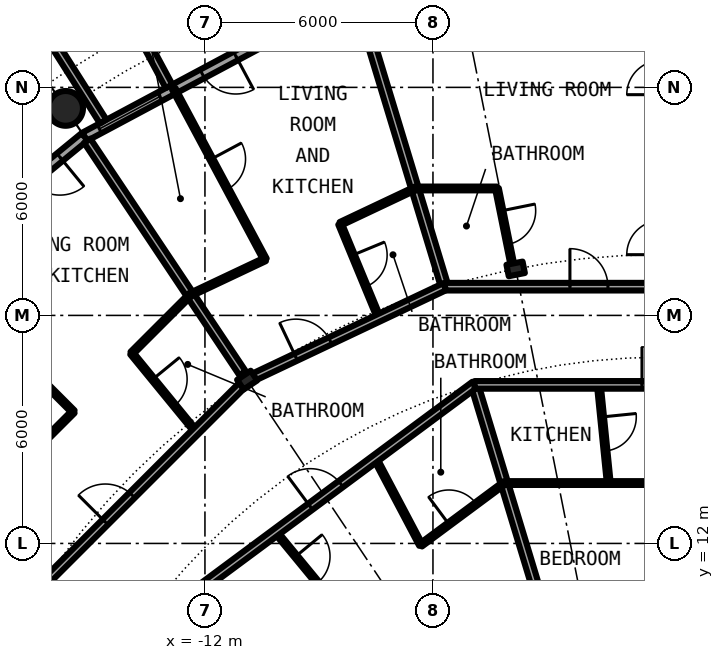
"""IFC4 building model, lengths in metres.
Left out: names, types, materials, properties, quantities, classifications, styles, units other than length and angle.
Written with IfcOpenShell. Run it as: python <this file> out.ifc"""

import sys

from ifc_helpers import new_model, si_unit, direction, frame, frame_2d, origin, origin_2d, place, context, subcontext, project, spatial, rectangle, hollow_circle, i_section, extrude, element, fill, save


model = new_model("IFC4")
c1 = context("Model", 3, precision=1e-05, world=origin(), true_north=direction((0.0, 1.0)))
c2 = subcontext(c1, "Body", "Model", "MODEL_VIEW")
j1 = project(units=[si_unit("LENGTHUNIT", "METRE"), si_unit("PLANEANGLEUNIT", "RADIAN")], contexts=[c1])
p1 = place(None, origin())
s1 = spatial("IfcSite", under=j1, at=p1, CompositionType="ELEMENT")
p2 = place(p1, origin())
s2 = spatial("IfcBuilding", under=s1, at=p2, CompositionType="ELEMENT")
p3 = place(p2, frame((0.0, 0.0, 120.8)))
s3 = spatial("IfcBuildingStorey", under=s2, at=p3, CompositionType="ELEMENT", Elevation=120.8)
p4 = place(p3, frame((-15.667, 23.448, 0.0), z_axis=(0.0, 0.0, 1.0), x_axis=(1.0, 0.0, 0.0)))
e1 = element("IfcColumn", 1, at=p4, inside=s3, PredefinedType="COLUMN", context=c2, shape_type="SweptSolid", body=[
    extrude(hollow_circle(Radius=0.457, WallThickness=0.04, at=origin_2d()), origin(), (0.0, 0.0, 1.0), 3.05),
])
for number, where, z_axis, x_axis in (
    (2, (-3.824, 19.223, 0.0), (0.0, 0.0, 1.0), (-0.195, 0.981, 0.0)),
    (3, (-10.889, 16.297, 0.0), (0.0, 0.0, 1.0), (-0.556, 0.831, 0.0)),
):
    element("IfcColumn", number, at=place(p3, frame(where, z_axis=z_axis, x_axis=x_axis)), inside=s3, PredefinedType="COLUMN", context=c2, shape_type="SweptSolid", body=[
        extrude(i_section(OverallWidth=0.307, OverallDepth=0.432, WebThickness=0.021, FlangeThickness=0.04, FilletRadius=0.027, at=origin_2d()), origin(), (0.0, 0.0, 1.0), 3.05),
    ])
p5 = place(p3, frame((-10.447, 25.222, 0.0), z_axis=(0.0, 0.0, 1.0), x_axis=(-0.881915646801, -0.471407246368, 0.0)))
e4 = element("IfcWall", 4, at=p5, inside=s3, PredefinedType="SOLIDWALL", context=c2, shape_type="SweptSolid", body=[
    extrude(rectangle(XDim=5.352, YDim=0.25, at=frame_2d((2.676, 0.0))), origin(), (0.0, 0.0, 1.0), 2.7),
])
p6 = place(p5, frame((0.841, 0.0, 0.0)))
e5 = element("IfcOpeningElement", 5, at=p6, cuts=e4, PredefinedType="OPENING", context=c2, shape_type="SweptSolid", body=[
    extrude(rectangle(XDim=1.0, YDim=2.2, at=frame_2d((0.5, 1.1))), frame((0.0, 0.135, 0.0), z_axis=(0.0, -1.0, 0.0), x_axis=(1.0, 0.0, 0.0)), (0.0, 0.0, 1.0), 0.27),
])
p7 = place(p5, frame((3.111, 0.0, 0.3)))
e6 = element("IfcOpeningElement", 6, at=p7, cuts=e4, PredefinedType="OPENING", context=c2, shape_type="SweptSolid", body=[
    extrude(rectangle(XDim=1.8, YDim=2.1, at=frame_2d((0.9, 1.05))), frame((0.0, 0.135, 0.0), z_axis=(0.0, -1.0, 0.0), x_axis=(1.0, 0.0, 0.0)), (0.0, 0.0, 1.0), 0.27),
])
p8 = place(p3, frame((-12.945, 24.029, -0.03), z_axis=(0.0, 0.0, 1.0), x_axis=(-0.474424310775, 0.88029629861, 0.0)))
e7 = element("IfcWall", 7, at=p8, inside=s3, PredefinedType="SOLIDWALL", context=c2, shape_type="SweptSolid", body=[
    extrude(rectangle(XDim=3.006, YDim=0.2, at=frame_2d((1.503, 0.0))), origin(), (0.0, 0.0, 1.0), 2.73),
])
p9 = place(p3, frame((-14.678, 23.102, -0.03), z_axis=(0.0, 0.0, 1.0), x_axis=(-0.536001536573, 0.844217005746, 0.0)))
e8 = element("IfcWall", 8, at=p9, inside=s3, PredefinedType="SOLIDWALL", context=c2, shape_type="SweptSolid", body=[
    extrude(rectangle(XDim=2.929, YDim=0.2, at=frame_2d((1.465, 0.0))), origin(), (0.0, 0.0, 1.0), 2.73),
])
p10 = place(p3, frame((-15.167, 22.699, 0.0), z_axis=(0.0, 0.0, 1.0), x_axis=(-0.773019449054, -0.634382322723, 0.0)))
e9 = element("IfcWall", 9, at=p10, inside=s3, PredefinedType="SOLIDWALL", context=c2, shape_type="SweptSolid", body=[
    extrude(rectangle(XDim=5.352, YDim=0.25, at=frame_2d((2.676, 0.0))), origin(), (0.0, 0.0, 1.0), 2.7),
])
p11 = place(p10, frame((0.841, 0.0, 0.0)))
e10 = element("IfcOpeningElement", 10, at=p11, cuts=e9, PredefinedType="OPENING", context=c2, shape_type="SweptSolid", body=[
    extrude(rectangle(XDim=1.0, YDim=2.2, at=frame_2d((0.5, 1.1))), frame((0.0, 0.135, 0.0), z_axis=(0.0, -1.0, 0.0), x_axis=(1.0, 0.0, 0.0)), (0.0, 0.0, 1.0), 0.27),
])
p12 = place(p10, frame((3.111, 0.0, 0.3)))
e11 = element("IfcOpeningElement", 11, at=p12, cuts=e9, PredefinedType="OPENING", context=c2, shape_type="SweptSolid", body=[
    extrude(rectangle(XDim=1.8, YDim=2.1, at=frame_2d((0.9, 1.05))), frame((0.0, 0.135, 0.0), z_axis=(0.0, -1.0, 0.0), x_axis=(1.0, 0.0, 0.0)), (0.0, 0.0, 1.0), 0.27),
])
p13 = place(p3, frame((-7.887, 26.005, 0.0), z_axis=(0.0, 0.0, 1.0), x_axis=(0.29005838641, -0.957008951094, 0.0)))
e12 = element("IfcWall", 12, at=p13, inside=s3, PredefinedType="PARTITIONING", context=c2, shape_type="SweptSolid", body=[
    extrude(rectangle(XDim=7.574, YDim=0.2, at=frame_2d((3.787, 0.0))), origin(), (0.0, 0.0, 1.0), 2.7),
])
p14 = place(p3, frame((-4.907, 16.172, 0.0), z_axis=(0.0, 0.0, 1.0), x_axis=(0.289977130626, -0.957033575019, 0.0)))
e13 = element("IfcWall", 13, at=p14, inside=s3, PredefinedType="PARTITIONING", context=c2, shape_type="SweptSolid", body=[
    extrude(rectangle(XDim=9.18, YDim=0.2, at=frame_2d((4.59, 0.0))), origin(), (0.0, 0.0, 1.0), 2.7),
])
p15 = place(p3, frame((-19.216, 19.216, 0.0), z_axis=(0.0, 0.0, 1.0), x_axis=(0.707106781187, -0.707106781187, 0.0)))
e14 = element("IfcWall", 14, at=p15, inside=s3, PredefinedType="PARTITIONING", context=c2, shape_type="SweptSolid", body=[
    extrude(rectangle(XDim=5.305, YDim=0.1, at=frame_2d((2.652, 0.0))), origin(), (0.0, 0.0, 1.0), 2.7),
])
p16 = place(p15, frame((2.202, 0.0, 0.0)))
e15 = element("IfcOpeningElement", 15, at=p16, cuts=e14, PredefinedType="OPENING", context=c2, shape_type="SweptSolid", body=[
    extrude(rectangle(XDim=0.9, YDim=2.3, at=frame_2d((0.45, 1.15))), frame((0.0, 0.06, 0.0), z_axis=(0.0, -1.0, 0.0), x_axis=(1.0, 0.0, 0.0)), (0.0, 0.0, 1.0), 0.12),
])
p17 = place(p3, frame((-15.097, 22.595, 0.0), z_axis=(0.0, 0.0, 1.0), x_axis=(0.555572791, -0.831467903109, 0.0)))
e16 = element("IfcWall", 16, at=p17, inside=s3, PredefinedType="PARTITIONING", context=c2, shape_type="SweptSolid", body=[
    extrude(rectangle(XDim=7.358, YDim=0.2, at=frame_2d((3.679, 0.0))), origin(), (0.0, 0.0, 1.0), 2.7),
])
p18 = place(p3, frame((-13.927, 17.004, 0.0), z_axis=(0.0, 0.0, 1.0), x_axis=(0.633582447834, -0.77367517848, 0.0)))
e17 = element("IfcWall", 17, at=p18, inside=s3, PredefinedType="PARTITIONING", context=c2, shape_type="SweptSolid", body=[
    extrude(rectangle(XDim=2.661, YDim=0.1, at=frame_2d((1.331, 0.0))), origin(), (0.0, 0.0, 1.0), 2.7),
])
p19 = place(p18, frame((0.881, 0.0, 0.0)))
e18 = element("IfcOpeningElement", 18, at=p19, cuts=e17, PredefinedType="OPENING", context=c2, shape_type="SweptSolid", body=[
    extrude(rectangle(XDim=0.9, YDim=2.3, at=frame_2d((0.45, 1.15))), frame((0.0, 0.06, 0.0), z_axis=(0.0, -1.0, 0.0), x_axis=(1.0, 0.0, 0.0)), (0.0, 0.0, 1.0), 0.12),
])
p20 = place(p3, frame((-12.82, 23.961, 0.0), z_axis=(0.0, 0.0, 1.0), x_axis=(0.471735511233, -0.881740101981, 0.0)))
e19 = element("IfcWall", 19, at=p20, inside=s3, PredefinedType="PARTITIONING", context=c2, shape_type="SweptSolid", body=[
    extrude(rectangle(XDim=5.09, YDim=0.1, at=frame_2d((2.545, 0.0))), origin(), (0.0, 0.0, 1.0), 2.7),
])
p21 = place(p20, frame((2.095, 0.0, 0.0)))
e20 = element("IfcOpeningElement", 20, at=p21, cuts=e19, PredefinedType="OPENING", context=c2, shape_type="SweptSolid", body=[
    extrude(rectangle(XDim=0.9, YDim=2.3, at=frame_2d((0.45, 1.15))), frame((0.0, 0.06, 0.0), z_axis=(0.0, -1.0, 0.0), x_axis=(1.0, 0.0, 0.0)), (0.0, 0.0, 1.0), 0.12),
])
p22 = place(p3, frame((-10.132, 12.296, 0.0), z_axis=(0.0, 0.0, 1.0), x_axis=(0.635976043025, -0.771708800454, 0.0)))
e21 = element("IfcWall", 21, at=p22, inside=s3, PredefinedType="PARTITIONING", context=c2, shape_type="SweptSolid", body=[
    extrude(rectangle(XDim=8.213, YDim=0.1, at=frame_2d((4.106, 0.0))), origin(), (0.0, 0.0, 1.0), 2.7),
])
p23 = place(p22, frame((0.823, 0.0, 0.0)))
e22 = element("IfcOpeningElement", 22, at=p23, cuts=e21, PredefinedType="OPENING", context=c2, shape_type="SweptSolid", body=[
    extrude(rectangle(XDim=0.9, YDim=2.3, at=frame_2d((0.45, 1.15))), frame((0.0, 0.06, 0.0), z_axis=(0.0, -1.0, 0.0), x_axis=(1.0, 0.0, 0.0)), (0.0, 0.0, 1.0), 0.12),
])
p24 = place(p22, frame((4.929, 0.0, 0.0)))
e23 = element("IfcOpeningElement", 23, at=p24, cuts=e21, PredefinedType="OPENING", context=c2, shape_type="SweptSolid", body=[
    extrude(rectangle(XDim=0.9, YDim=2.3, at=frame_2d((0.45, 1.15))), frame((0.0, 0.06, 0.0), z_axis=(0.0, -1.0, 0.0), x_axis=(1.0, 0.0, 0.0)), (0.0, 0.0, 1.0), 0.12),
])
p25 = place(p3, frame((-8.445, 20.407, 0.0), z_axis=(0.0, 0.0, 1.0), x_axis=(0.382195876364, -0.924081334132, 0.0)))
e24 = element("IfcWall", 24, at=p25, inside=s3, PredefinedType="PARTITIONING", context=c2, shape_type="SweptSolid", body=[
    extrude(rectangle(XDim=2.674, YDim=0.1, at=frame_2d((1.337, 0.0))), origin(), (0.0, 0.0, 1.0), 2.7),
])
p26 = place(p25, frame((0.887, 0.0, 0.0)))
e25 = element("IfcOpeningElement", 25, at=p26, cuts=e24, PredefinedType="OPENING", context=c2, shape_type="SweptSolid", body=[
    extrude(rectangle(XDim=0.9, YDim=2.3, at=frame_2d((0.45, 1.15))), frame((0.0, 0.06, 0.0), z_axis=(0.0, -1.0, 0.0), x_axis=(1.0, 0.0, 0.0)), (0.0, 0.0, 1.0), 0.12),
])
p27 = place(p3, frame((-7.519, 14.234, 0.0), z_axis=(0.0, 0.0, 1.0), x_axis=(0.467001992543, -0.884256263173, 0.0)))
e26 = element("IfcWall", 26, at=p27, inside=s3, PredefinedType="PARTITIONING", context=c2, shape_type="SweptSolid", body=[
    extrude(rectangle(XDim=2.572, YDim=0.1, at=frame_2d((1.286, 0.0))), origin(), (0.0, 0.0, 1.0), 2.7),
])
p28 = place(p3, frame((-4.316, 21.34, 0.0), z_axis=(0.0, 0.0, 1.0), x_axis=(0.198348087074, -0.980131642359, 0.0)))
e27 = element("IfcWall", 27, at=p28, inside=s3, PredefinedType="PARTITIONING", context=c2, shape_type="SweptSolid", body=[
    extrude(rectangle(XDim=1.956, YDim=0.1, at=frame_2d((0.978, 0.0))), origin(), (0.0, 0.0, 1.0), 2.7),
])
p29 = place(p28, frame((0.6, 0.0, 0.0)))
e28 = element("IfcOpeningElement", 28, at=p29, cuts=e27, PredefinedType="OPENING", context=c2, shape_type="SweptSolid", body=[
    extrude(rectangle(XDim=0.9, YDim=2.3, at=frame_2d((0.45, 1.15))), frame((0.0, 0.06, 0.0), z_axis=(0.0, -1.0, 0.0), x_axis=(1.0, 0.0, 0.0)), (0.0, 0.0, 1.0), 0.12),
])
p30 = place(p3, frame((-1.635, 16.172, 0.0), z_axis=(0.0, 0.0, 1.0), x_axis=(0.100527855112, -0.994934244233, 0.0)))
e29 = element("IfcWall", 29, at=p30, inside=s3, PredefinedType="PARTITIONING", context=c2, shape_type="SweptSolid", body=[
    extrude(rectangle(XDim=2.596, YDim=0.1, at=frame_2d((1.298, 0.0))), origin(), (0.0, 0.0, 1.0), 2.7),
])
p31 = place(p30, frame((0.848, 0.0, 0.0)))
e30 = element("IfcOpeningElement", 30, at=p31, cuts=e29, PredefinedType="OPENING", context=c2, shape_type="SweptSolid", body=[
    extrude(rectangle(XDim=0.9, YDim=2.3, at=frame_2d((0.45, 1.15))), frame((0.0, 0.06, 0.0), z_axis=(0.0, -1.0, 0.0), x_axis=(1.0, 0.0, 0.0)), (0.0, 0.0, 1.0), 0.12),
])
p32 = place(p3, frame((-6.318, 11.96, 0.0), z_axis=(0.0, 0.0, 1.0), x_axis=(0.803128348509, 0.595806055542, 0.0)))
e31 = element("IfcWall", 31, at=p32, inside=s3, PredefinedType="PARTITIONING", context=c2, shape_type="SweptSolid", body=[
    extrude(rectangle(XDim=2.734, YDim=0.1, at=frame_2d((1.367, 0.0))), origin(), (0.0, 0.0, 1.0), 2.7),
])
p33 = place(p32, frame((0.917, 0.0, 0.0)))
e32 = element("IfcOpeningElement", 32, at=p33, cuts=e31, PredefinedType="OPENING", context=c2, shape_type="SweptSolid", body=[
    extrude(rectangle(XDim=0.9, YDim=2.3, at=frame_2d((0.45, 1.15))), frame((0.0, 0.06, 0.0), z_axis=(0.0, -1.0, 0.0), x_axis=(1.0, 0.0, 0.0)), (0.0, 0.0, 1.0), 0.12),
])
p34 = place(p3, frame((-4.122, 13.589, 0.0), z_axis=(0.0, 0.0, 1.0), x_axis=(1.0, 0.0, 0.0)))
e33 = element("IfcWall", 33, at=p34, inside=s3, PredefinedType="PARTITIONING", context=c2, shape_type="SweptSolid", body=[
    extrude(rectangle(XDim=4.122, YDim=0.1, at=frame_2d((2.061, 0.0))), origin(), (0.0, 0.0, 1.0), 2.7),
])
p35 = place(p3, frame((-14.052, 9.389, 0.0), z_axis=(0.0, 0.0, 1.0), x_axis=(0.803204584823, 0.59570327758, 0.0)))
e34 = element("IfcWall", 34, at=p35, inside=s3, PredefinedType="PARTITIONING", context=c2, shape_type="SweptSolid", body=[
    extrude(rectangle(XDim=11.387, YDim=0.2, at=frame_2d((5.693, 0.0))), origin(), (0.0, 0.0, 1.0), 2.7),
])
p36 = place(p35, frame((6.007, 0.0, 0.0)))
e35 = element("IfcOpeningElement", 35, at=p36, cuts=e34, PredefinedType="OPENING", context=c2, shape_type="SweptSolid", body=[
    extrude(rectangle(XDim=1.0, YDim=2.3, at=frame_2d((0.5, 1.15))), frame((0.0, 0.11, 0.0), z_axis=(0.0, -1.0, 0.0), x_axis=(1.0, 0.0, 0.0)), (0.0, 0.0, 1.0), 0.22),
])
p37 = place(p3, frame((-4.906, 16.172, 0.0), z_axis=(0.0, 0.0, 1.0), x_axis=(1.0, 0.0, 0.0)))
e36 = element("IfcWall", 36, at=p37, inside=s3, PredefinedType="PARTITIONING", context=c2, shape_type="SweptSolid", body=[
    extrude(rectangle(XDim=9.812, YDim=0.2, at=frame_2d((4.906, 0.0))), origin(), (0.0, 0.0, 1.0), 2.7),
])
p38 = place(p37, frame((4.406, 0.0, 0.0)))
e37 = element("IfcOpeningElement", 37, at=p38, cuts=e36, PredefinedType="OPENING", context=c2, shape_type="SweptSolid", body=[
    extrude(rectangle(XDim=1.0, YDim=2.3, at=frame_2d((0.5, 1.15))), frame((0.0, 0.11, 0.0), z_axis=(0.0, -1.0, 0.0), x_axis=(1.0, 0.0, 0.0)), (0.0, 0.0, 1.0), 0.22),
])
p39 = place(p3, frame((-5.69, 18.756, 0.0), z_axis=(0.0, 0.0, 1.0), x_axis=(1.0, 0.0, 0.0)))
e38 = element("IfcWall", 38, at=p39, inside=s3, PredefinedType="PARTITIONING", context=c2, shape_type="SweptSolid", body=[
    extrude(rectangle(XDim=11.38, YDim=0.2, at=frame_2d((5.69, 0.0))), origin(), (0.0, 0.0, 1.0), 2.7),
])
p40 = place(p39, frame((3.294, 0.0, 0.0)))
e39 = element("IfcOpeningElement", 39, at=p40, cuts=e38, PredefinedType="OPENING", context=c2, shape_type="SweptSolid", body=[
    extrude(rectangle(XDim=1.0, YDim=2.3, at=frame_2d((0.5, 1.15))), frame((0.0, 0.11, 0.0), z_axis=(0.0, -1.0, 0.0), x_axis=(1.0, 0.0, 0.0)), (0.0, 0.0, 1.0), 0.22),
])
p41 = place(p3, frame((-16.186, 11.0, 0.0), z_axis=(0.0, 0.0, 1.0), x_axis=(0.707106781187, 0.707106781187, 0.0)))
e40 = element("IfcWall", 40, at=p41, inside=s3, PredefinedType="PARTITIONING", context=c2, shape_type="SweptSolid", body=[
    extrude(rectangle(XDim=7.334, YDim=0.2, at=frame_2d((3.667, 0.0))), origin(), (0.0, 0.0, 1.0), 2.39),
])
p42 = place(p41, frame((2.211, 0.0, 0.0)))
e41 = element("IfcOpeningElement", 41, at=p42, cuts=e40, PredefinedType="OPENING", context=c2, shape_type="SweptSolid", body=[
    extrude(rectangle(XDim=1.0, YDim=2.3, at=frame_2d((0.5, 1.15))), frame((0.0, 0.11, 0.0), z_axis=(0.0, -1.0, 0.0), x_axis=(1.0, 0.0, 0.0)), (0.0, 0.0, 1.0), 0.22),
])
p43 = place(p3, frame((-10.748, 16.362, 0.0), z_axis=(0.0, 0.0, 1.0), x_axis=(0.903869270233, 0.427808768409, 0.0)))
e42 = element("IfcWall", 42, at=p43, inside=s3, PredefinedType="PARTITIONING", context=c2, shape_type="SweptSolid", body=[
    extrude(rectangle(XDim=5.596, YDim=0.2, at=frame_2d((2.798, 0.0))), origin(), (0.0, 0.0, 1.0), 2.39),
])
p44 = place(p43, frame((1.262, 0.0, 0.0)))
e43 = element("IfcOpeningElement", 43, at=p44, cuts=e42, PredefinedType="OPENING", context=c2, shape_type="SweptSolid", body=[
    extrude(rectangle(XDim=1.0, YDim=2.3, at=frame_2d((0.5, 1.15))), frame((0.0, 0.11, 0.0), z_axis=(0.0, -1.0, 0.0), x_axis=(1.0, 0.0, 0.0)), (0.0, 0.0, 1.0), 0.22),
])
p45 = place(p3, frame((-6.473, 21.34, 0.0), z_axis=(0.0, 0.0, 1.0), x_axis=(1.0, 0.0, 0.0)))
e44 = element("IfcWall", 44, at=p45, inside=s3, PredefinedType="PARTITIONING", context=c2, shape_type="SweptSolid", body=[
    extrude(rectangle(XDim=2.157, YDim=0.1, at=frame_2d((1.079, 0.0))), origin(), (0.0, 0.0, 1.0), 2.7),
])
p46 = place(p3, frame((-18.542, 12.389, 0.0), z_axis=(0.0, 0.0, 1.0), x_axis=(0.707190945535, 0.707022606819, 0.0)))
e45 = element("IfcWall", 45, at=p46, inside=s3, PredefinedType="PARTITIONING", context=c2, shape_type="SweptSolid", body=[
    extrude(rectangle(XDim=4.351, YDim=0.1, at=frame_2d((2.175, 0.0))), origin(), (0.0, 0.0, 1.0), 2.7),
])
p47 = place(p46, frame((0.639, 0.0, 0.0)))
e46 = element("IfcOpeningElement", 46, at=p47, cuts=e45, PredefinedType="OPENING", context=c2, shape_type="SweptSolid", body=[
    extrude(rectangle(XDim=0.9, YDim=2.3, at=frame_2d((0.45, 1.15))), frame((0.0, 0.06, 0.0), z_axis=(0.0, -1.0, 0.0), x_axis=(1.0, 0.0, 0.0)), (0.0, 0.0, 1.0), 0.12),
])
p48 = place(p3, frame((-13.924, 17.006, 0.0), z_axis=(0.0, 0.0, 1.0), x_axis=(0.707387256653, 0.706826194425, 0.0)))
e47 = element("IfcWall", 47, at=p48, inside=s3, PredefinedType="PARTITIONING", context=c2, shape_type="SweptSolid", body=[
    extrude(rectangle(XDim=2.176, YDim=0.1, at=frame_2d((1.088, 0.0))), origin(), (0.0, 0.0, 1.0), 2.7),
])
for number, where, z_axis, x_axis in (
    (48, (-12.389, 18.542, 0.0), (0.0, 0.0, 1.0), (0.904, 0.427, 0.0)),
    (49, (-8.436, 20.41, 0.0), (0.0, 0.0, 1.0), (0.904, 0.427, 0.0)),
):
    element("IfcWall", number, at=place(p3, frame(where, z_axis=z_axis, x_axis=x_axis)), inside=s3, PredefinedType="PARTITIONING", context=c2, shape_type="SweptSolid", body=[
        extrude(rectangle(XDim=2.181, YDim=0.1, at=frame_2d((1.091, 0.0))), origin(), (0.0, 0.0, 1.0), 2.7),
    ])
p49 = place(p6, origin())
e50 = element("IfcDoor", 50, at=p49, inside=s3, OperationType="SINGLE_SWING_LEFT", PredefinedType="DOOR", context=c2, shape_type="SweptSolid", body=[
    extrude(rectangle(XDim=1.0, YDim=2.2, at=frame_2d((0.5, 1.1))), frame((0.0, 0.025, 0.0), z_axis=(0.0, -1.0, 0.0), x_axis=(1.0, 0.0, 0.0)), (0.0, 0.0, 1.0), 0.05),
])
fill(e5, e50)
p50 = place(p7, origin())
e51 = element("IfcWindow", 51, at=p50, inside=s3, PartitioningType="SINGLE_PANEL", PredefinedType="WINDOW", context=c2, shape_type="SweptSolid", body=[
    extrude(rectangle(XDim=1.8, YDim=2.1, at=frame_2d((0.9, 1.05))), frame((0.0, 0.03, 0.0), z_axis=(0.0, -1.0, 0.0), x_axis=(1.0, 0.0, 0.0)), (0.0, 0.0, 1.0), 0.06),
])
fill(e6, e51)
p51 = place(p11, origin())
e52 = element("IfcDoor", 52, at=p51, inside=s3, OperationType="SINGLE_SWING_LEFT", PredefinedType="DOOR", context=c2, shape_type="SweptSolid", body=[
    extrude(rectangle(XDim=1.0, YDim=2.2, at=frame_2d((0.5, 1.1))), frame((0.0, 0.025, 0.0), z_axis=(0.0, -1.0, 0.0), x_axis=(1.0, 0.0, 0.0)), (0.0, 0.0, 1.0), 0.05),
])
fill(e10, e52)
p52 = place(p40, origin())
e53 = element("IfcDoor", 53, at=p52, inside=s3, OperationType="SINGLE_SWING_LEFT", PredefinedType="DOOR", context=c2, shape_type="SweptSolid", body=[
    extrude(rectangle(XDim=1.0, YDim=2.3, at=frame_2d((0.5, 1.15))), frame((0.0, 0.025, 0.0), z_axis=(0.0, -1.0, 0.0), x_axis=(1.0, 0.0, 0.0)), (0.0, 0.0, 1.0), 0.05),
])
fill(e39, e53)
p53 = place(p29, origin())
e54 = element("IfcDoor", 54, at=p53, inside=s3, OperationType="SINGLE_SWING_RIGHT", PredefinedType="DOOR", context=c2, shape_type="SweptSolid", body=[
    extrude(rectangle(XDim=0.9, YDim=2.3, at=frame_2d((0.45, 1.15))), frame((0.0, 0.025, 0.0), z_axis=(0.0, -1.0, 0.0), x_axis=(1.0, 0.0, 0.0)), (0.0, 0.0, 1.0), 0.05),
])
fill(e28, e54)
p54 = place(p44, origin())
e55 = element("IfcDoor", 55, at=p54, inside=s3, OperationType="SINGLE_SWING_LEFT", PredefinedType="DOOR", context=c2, shape_type="SweptSolid", body=[
    extrude(rectangle(XDim=1.0, YDim=2.3, at=frame_2d((0.5, 1.15))), frame((0.0, 0.025, 0.0), z_axis=(0.0, -1.0, 0.0), x_axis=(1.0, 0.0, 0.0)), (0.0, 0.0, 1.0), 0.05),
])
fill(e43, e55)
p55 = place(p26, origin())
e56 = element("IfcDoor", 56, at=p55, inside=s3, OperationType="SINGLE_SWING_RIGHT", PredefinedType="DOOR", context=c2, shape_type="SweptSolid", body=[
    extrude(rectangle(XDim=0.9, YDim=2.3, at=frame_2d((0.45, 1.15))), frame((0.0, 0.025, 0.0), z_axis=(0.0, -1.0, 0.0), x_axis=(1.0, 0.0, 0.0)), (0.0, 0.0, 1.0), 0.05),
])
fill(e25, e56)
p56 = place(p21, origin())
e57 = element("IfcDoor", 57, at=p56, inside=s3, OperationType="SINGLE_SWING_RIGHT", PredefinedType="DOOR", context=c2, shape_type="SweptSolid", body=[
    extrude(rectangle(XDim=0.9, YDim=2.3, at=frame_2d((0.45, 1.15))), frame((0.0, 0.025, 0.0), z_axis=(0.0, -1.0, 0.0), x_axis=(1.0, 0.0, 0.0)), (0.0, 0.0, 1.0), 0.05),
])
fill(e20, e57)
p57 = place(p42, origin())
e58 = element("IfcDoor", 58, at=p57, inside=s3, OperationType="SINGLE_SWING_LEFT", PredefinedType="DOOR", context=c2, shape_type="SweptSolid", body=[
    extrude(rectangle(XDim=1.0, YDim=2.3, at=frame_2d((0.5, 1.15))), frame((0.0, 0.025, 0.0), z_axis=(0.0, -1.0, 0.0), x_axis=(1.0, 0.0, 0.0)), (0.0, 0.0, 1.0), 0.05),
])
fill(e41, e58)
p58 = place(p19, origin())
e59 = element("IfcDoor", 59, at=p58, inside=s3, OperationType="SINGLE_SWING_RIGHT", PredefinedType="DOOR", context=c2, shape_type="SweptSolid", body=[
    extrude(rectangle(XDim=0.9, YDim=2.3, at=frame_2d((0.45, 1.15))), frame((0.0, 0.025, 0.0), z_axis=(0.0, -1.0, 0.0), x_axis=(1.0, 0.0, 0.0)), (0.0, 0.0, 1.0), 0.05),
])
fill(e18, e59)
p59 = place(p38, origin())
e60 = element("IfcDoor", 60, at=p59, inside=s3, OperationType="SINGLE_SWING_LEFT", PredefinedType="DOOR", context=c2, shape_type="SweptSolid", body=[
    extrude(rectangle(XDim=1.0, YDim=2.3, at=frame_2d((0.5, 1.15))), frame((0.0, 0.025, 0.0), z_axis=(0.0, -1.0, 0.0), x_axis=(1.0, 0.0, 0.0)), (0.0, 0.0, 1.0), 0.05),
])
fill(e37, e60)
p60 = place(p31, origin())
e61 = element("IfcDoor", 61, at=p60, inside=s3, OperationType="SINGLE_SWING_LEFT", PredefinedType="DOOR", context=c2, shape_type="SweptSolid", body=[
    extrude(rectangle(XDim=0.9, YDim=2.3, at=frame_2d((0.45, 1.15))), frame((0.0, 0.025, 0.0), z_axis=(0.0, -1.0, 0.0), x_axis=(1.0, 0.0, 0.0)), (0.0, 0.0, 1.0), 0.05),
])
fill(e30, e61)
p61 = place(p36, origin())
e62 = element("IfcDoor", 62, at=p61, inside=s3, OperationType="SINGLE_SWING_RIGHT", PredefinedType="DOOR", context=c2, shape_type="SweptSolid", body=[
    extrude(rectangle(XDim=1.0, YDim=2.3, at=frame_2d((0.5, 1.15))), frame((0.0, 0.025, 0.0), z_axis=(0.0, -1.0, 0.0), x_axis=(1.0, 0.0, 0.0)), (0.0, 0.0, 1.0), 0.05),
])
fill(e35, e62)
p62 = place(p33, origin())
e63 = element("IfcDoor", 63, at=p62, inside=s3, OperationType="SINGLE_SWING_RIGHT", PredefinedType="DOOR", context=c2, shape_type="SweptSolid", body=[
    extrude(rectangle(XDim=0.9, YDim=2.3, at=frame_2d((0.45, 1.15))), frame((0.0, 0.025, 0.0), z_axis=(0.0, -1.0, 0.0), x_axis=(1.0, 0.0, 0.0)), (0.0, 0.0, 1.0), 0.05),
])
fill(e32, e63)
p63 = place(p23, origin())
e64 = element("IfcDoor", 64, at=p63, inside=s3, OperationType="SINGLE_SWING_LEFT", PredefinedType="DOOR", context=c2, shape_type="SweptSolid", body=[
    extrude(rectangle(XDim=0.9, YDim=2.3, at=frame_2d((0.45, 1.15))), frame((0.0, 0.025, 0.0), z_axis=(0.0, -1.0, 0.0), x_axis=(1.0, 0.0, 0.0)), (0.0, 0.0, 1.0), 0.05),
])
fill(e22, e64)
save(model, sys.argv[1])
